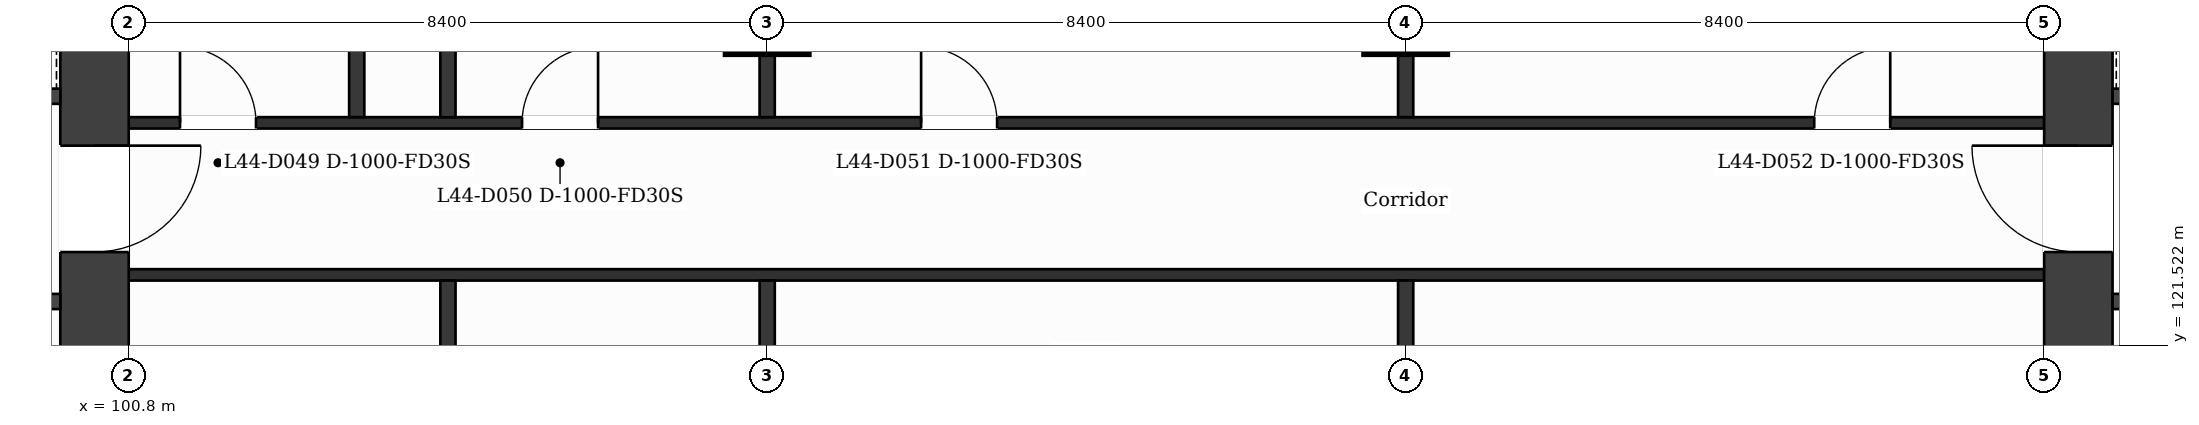
"""IFC4 building model, lengths in metres.
Left out: names, types, materials, properties, quantities, classifications, styles, units other than length and angle.
Written with IfcOpenShell. Run it as: python <this file> out.ifc"""

import sys

from ifc_helpers import new_model, si_unit, direction, frame, frame_2d, origin, origin_2d, place, context, subcontext, project, spatial, rectangle, extrude, element, fill, save


model = new_model("IFC4")
c1 = context("Model", 3, precision=1e-05, world=origin(), true_north=direction((0.0, 1.0)))
c2 = subcontext(c1, "Body", "Model", "MODEL_VIEW")
j1 = project(units=[si_unit("LENGTHUNIT", "METRE"), si_unit("PLANEANGLEUNIT", "RADIAN")], contexts=[c1])
p1 = place(None, origin())
s1 = spatial("IfcSite", under=j1, at=p1, CompositionType="ELEMENT")
p2 = place(p1, origin())
s2 = spatial("IfcBuilding", under=s1, at=p2, CompositionType="ELEMENT")
p3 = place(p2, frame((0.0, 0.0, 184.8)))
s3 = spatial("IfcBuildingStorey", under=s2, at=p3, CompositionType="ELEMENT", Elevation=184.8)
p4 = place(p3, frame((100.35, 131.95, 0.0), z_axis=(0.0, 0.0, 1.0), x_axis=(0.0, -1.0, 0.0)))
e1 = element("IfcWall", 1, at=p4, inside=s3, PredefinedType="SHEAR", context=c2, shape_type="SweptSolid", body=[
    extrude(rectangle(XDim=21.1, YDim=0.9, at=frame_2d((10.55, 0.0))), origin(), (0.0, 0.0, 1.0), 3.7),
])
p5 = place(p4, frame((7.8, 0.0, 0.0)))
e2 = element("IfcOpeningElement", 2, at=p5, cuts=e1, PredefinedType="OPENING", context=c2, shape_type="SweptSolid", body=[
    extrude(rectangle(XDim=1.4, YDim=2.1, at=frame_2d((0.7, 1.05))), frame((0.0, 0.46, 0.0), z_axis=(0.0, -1.0, 0.0), x_axis=(1.0, 0.0, 0.0)), (0.0, 0.0, 1.0), 0.92),
])
p6 = place(p3, frame((126.45, 110.85, 0.0), z_axis=(0.0, 0.0, 1.0), x_axis=(0.0, 1.0, 0.0)))
e3 = element("IfcWall", 3, at=p6, inside=s3, PredefinedType="SHEAR", context=c2, shape_type="SweptSolid", body=[
    extrude(rectangle(XDim=21.1, YDim=0.9, at=frame_2d((10.55, 0.0))), origin(), (0.0, 0.0, 1.0), 3.7),
])
p7 = place(p6, frame((11.9, 0.0, 0.0)))
e4 = element("IfcOpeningElement", 4, at=p7, cuts=e3, PredefinedType="OPENING", context=c2, shape_type="SweptSolid", body=[
    extrude(rectangle(XDim=1.4, YDim=2.1, at=frame_2d((0.7, 1.05))), frame((0.0, 0.46, 0.0), z_axis=(0.0, -1.0, 0.0), x_axis=(1.0, 0.0, 0.0)), (0.0, 0.0, 1.0), 0.92),
])
for number, where, z_axis, x_axis in (
    (5, (109.2, 125.9, 0.0), (0.0, 0.0, 1.0), (1.0, 0.0, 0.0)),
    (6, (117.6, 125.9, 0.0), (0.0, 0.0, 1.0), (1.0, 0.0, 0.0)),
):
    element("IfcColumn", number, at=place(p3, frame(where, z_axis=z_axis, x_axis=x_axis)), inside=s3, PredefinedType="COLUMN", context=c2, shape_type="SweptSolid", body=[
        extrude(rectangle(XDim=1.1, YDim=1.1, at=origin_2d()), origin(), (0.0, 0.0, 1.0), 3.7),
    ])
p8 = place(p3, frame((95.227, 122.1, 0.0), z_axis=(0.0, 0.0, 1.0), x_axis=(1.0, 0.0, 0.0)))
e7 = element("IfcWall", 7, at=p8, inside=s3, PredefinedType="PARTITIONING", context=c2, shape_type="SweptSolid", body=[
    extrude(rectangle(XDim=4.673, YDim=0.2, at=frame_2d((2.336, 0.0))), origin(), (0.0, 0.0, 1.0), 3.38),
])
p9 = place(p8, frame((1.579, 0.0, 0.0)))
e8 = element("IfcOpeningElement", 8, at=p9, cuts=e7, PredefinedType="OPENING", context=c2, shape_type="SweptSolid", body=[
    extrude(rectangle(XDim=0.9, YDim=2.1, at=frame_2d((0.45, 1.05))), frame((0.0, 0.11, 0.0), z_axis=(0.0, -1.0, 0.0), x_axis=(1.0, 0.0, 0.0)), (0.0, 0.0, 1.0), 0.22),
])
p10 = place(p3, frame((126.9, 122.1, 0.0), z_axis=(0.0, 0.0, 1.0), x_axis=(1.0, 0.0, 0.0)))
e9 = element("IfcWall", 9, at=p10, inside=s3, PredefinedType="PARTITIONING", context=c2, shape_type="SweptSolid", body=[
    extrude(rectangle(XDim=4.673, YDim=0.2, at=frame_2d((2.336, 0.0))), origin(), (0.0, 0.0, 1.0), 3.38),
])
p11 = place(p10, frame((1.579, 0.0, 0.0)))
e10 = element("IfcOpeningElement", 10, at=p11, cuts=e9, PredefinedType="OPENING", context=c2, shape_type="SweptSolid", body=[
    extrude(rectangle(XDim=0.9, YDim=2.1, at=frame_2d((0.45, 1.05))), frame((0.0, 0.11, 0.0), z_axis=(0.0, -1.0, 0.0), x_axis=(1.0, 0.0, 0.0)), (0.0, 0.0, 1.0), 0.22),
])
p12 = place(p3, frame((100.8, 122.45, 0.0), z_axis=(0.0, 0.0, 1.0), x_axis=(1.0, 0.0, 0.0)))
e11 = element("IfcWall", 11, at=p12, inside=s3, PredefinedType="PARTITIONING", context=c2, shape_type="SweptSolid", body=[
    extrude(rectangle(XDim=25.2, YDim=0.15, at=frame_2d((12.6, 0.0))), origin(), (0.0, 0.0, 1.0), 3.38),
])
p13 = place(p3, frame((100.8, 124.45, 0.0), z_axis=(0.0, 0.0, 1.0), x_axis=(1.0, 0.0, 0.0)))
e12 = element("IfcWall", 12, at=p13, inside=s3, PredefinedType="PARTITIONING", context=c2, shape_type="SweptSolid", body=[
    extrude(rectangle(XDim=25.2, YDim=0.15, at=frame_2d((12.6, 0.0))), origin(), (0.0, 0.0, 1.0), 3.38),
])
p14 = place(p13, frame((0.675, 0.0, 0.0)))
e13 = element("IfcOpeningElement", 13, at=p14, cuts=e12, PredefinedType="OPENING", context=c2, shape_type="SweptSolid", body=[
    extrude(rectangle(XDim=1.0, YDim=2.1, at=frame_2d((0.5, 1.05))), frame((0.0, 0.085, 0.0), z_axis=(0.0, -1.0, 0.0), x_axis=(1.0, 0.0, 0.0)), (0.0, 0.0, 1.0), 0.17),
])
p15 = place(p13, frame((5.175, 0.0, 0.0)))
e14 = element("IfcOpeningElement", 14, at=p15, cuts=e12, PredefinedType="OPENING", context=c2, shape_type="SweptSolid", body=[
    extrude(rectangle(XDim=1.0, YDim=2.1, at=frame_2d((0.5, 1.05))), frame((0.0, 0.085, 0.0), z_axis=(0.0, -1.0, 0.0), x_axis=(1.0, 0.0, 0.0)), (0.0, 0.0, 1.0), 0.17),
])
p16 = place(p13, frame((10.425, 0.0, 0.0)))
e15 = element("IfcOpeningElement", 15, at=p16, cuts=e12, PredefinedType="OPENING", context=c2, shape_type="SweptSolid", body=[
    extrude(rectangle(XDim=1.0, YDim=2.1, at=frame_2d((0.5, 1.05))), frame((0.0, 0.085, 0.0), z_axis=(0.0, -1.0, 0.0), x_axis=(1.0, 0.0, 0.0)), (0.0, 0.0, 1.0), 0.17),
])
p17 = place(p13, frame((22.175, 0.0, 0.0)))
e16 = element("IfcOpeningElement", 16, at=p17, cuts=e12, PredefinedType="OPENING", context=c2, shape_type="SweptSolid", body=[
    extrude(rectangle(XDim=1.0, YDim=2.1, at=frame_2d((0.5, 1.05))), frame((0.0, 0.085, 0.0), z_axis=(0.0, -1.0, 0.0), x_axis=(1.0, 0.0, 0.0)), (0.0, 0.0, 1.0), 0.17),
])
p18 = place(p3, frame((92.702, 124.8, 0.0), z_axis=(0.0, 0.0, 1.0), x_axis=(1.0, 0.0, 0.0)))
e17 = element("IfcWall", 17, at=p18, inside=s3, PredefinedType="PARTITIONING", context=c2, shape_type="SweptSolid", body=[
    extrude(rectangle(XDim=7.198, YDim=0.2, at=frame_2d((3.599, 0.0))), origin(), (0.0, 0.0, 1.0), 3.38),
])
p19 = place(p18, frame((5.609, 0.0, 0.0)))
e18 = element("IfcOpeningElement", 18, at=p19, cuts=e17, PredefinedType="OPENING", context=c2, shape_type="SweptSolid", body=[
    extrude(rectangle(XDim=1.1, YDim=2.1, at=frame_2d((0.55, 1.05))), frame((0.0, 0.11, 0.0), z_axis=(0.0, -1.0, 0.0), x_axis=(1.0, 0.0, 0.0)), (0.0, 0.0, 1.0), 0.22),
])
p20 = place(p3, frame((126.9, 124.8, 0.0), z_axis=(0.0, 0.0, 1.0), x_axis=(1.0, 0.0, 0.0)))
e19 = element("IfcWall", 19, at=p20, inside=s3, PredefinedType="PARTITIONING", context=c2, shape_type="SweptSolid", body=[
    extrude(rectangle(XDim=4.715, YDim=0.2, at=frame_2d((2.358, 0.0))), origin(), (0.0, 0.0, 1.0), 3.38),
])
p21 = place(p20, frame((0.573, 0.0, 0.0)))
e20 = element("IfcOpeningElement", 20, at=p21, cuts=e19, PredefinedType="OPENING", context=c2, shape_type="SweptSolid", body=[
    extrude(rectangle(XDim=1.1, YDim=2.1, at=frame_2d((0.55, 1.05))), frame((0.0, 0.11, 0.0), z_axis=(0.0, -1.0, 0.0), x_axis=(1.0, 0.0, 0.0)), (0.0, 0.0, 1.0), 0.22),
])
p22 = place(p3, frame((103.8, 124.525, 0.0), z_axis=(0.0, 0.0, 1.0), x_axis=(0.0, 1.0, 0.0)))
e21 = element("IfcWall", 21, at=p22, inside=s3, PredefinedType="PARTITIONING", context=c2, shape_type="SweptSolid", body=[
    extrude(rectangle(XDim=5.825, YDim=0.2, at=frame_2d((2.913, 0.0))), origin(), (0.0, 0.0, 1.0), 3.38),
])
p23 = place(p3, frame((105.0, 109.075, 0.0), z_axis=(0.0, 0.0, 1.0), x_axis=(0.0, 1.0, 0.0)))
e22 = element("IfcWall", 22, at=p23, inside=s3, PredefinedType="PARTITIONING", context=c2, shape_type="SweptSolid", body=[
    extrude(rectangle(XDim=13.3, YDim=0.2, at=frame_2d((6.65, 0.0))), origin(), (0.0, 0.0, 1.0), 3.38),
])
p24 = place(p3, frame((105.0, 124.525, 0.0), z_axis=(0.0, 0.0, 1.0), x_axis=(0.0, 1.0, 0.0)))
e23 = element("IfcWall", 23, at=p24, inside=s3, PredefinedType="PARTITIONING", context=c2, shape_type="SweptSolid", body=[
    extrude(rectangle(XDim=9.2, YDim=0.2, at=frame_2d((4.6, 0.0))), origin(), (0.0, 0.0, 1.0), 3.38),
])
p25 = place(p3, frame((109.2, 109.075, 0.0), z_axis=(0.0, 0.0, 1.0), x_axis=(0.0, 1.0, 0.0)))
e24 = element("IfcWall", 24, at=p25, inside=s3, PredefinedType="PARTITIONING", context=c2, shape_type="SweptSolid", body=[
    extrude(rectangle(XDim=13.3, YDim=0.2, at=frame_2d((6.65, 0.0))), origin(), (0.0, 0.0, 1.0), 3.38),
])
p26 = place(p3, frame((109.2, 124.525, 0.0), z_axis=(0.0, 0.0, 1.0), x_axis=(0.0, 1.0, 0.0)))
e25 = element("IfcWall", 25, at=p26, inside=s3, PredefinedType="PARTITIONING", context=c2, shape_type="SweptSolid", body=[
    extrude(rectangle(XDim=9.2, YDim=0.2, at=frame_2d((4.6, 0.0))), origin(), (0.0, 0.0, 1.0), 3.38),
])
p27 = place(p3, frame((117.6, 109.075, 0.0), z_axis=(0.0, 0.0, 1.0), x_axis=(0.0, 1.0, 0.0)))
e26 = element("IfcWall", 26, at=p27, inside=s3, PredefinedType="PARTITIONING", context=c2, shape_type="SweptSolid", body=[
    extrude(rectangle(XDim=13.3, YDim=0.2, at=frame_2d((6.65, 0.0))), origin(), (0.0, 0.0, 1.0), 3.38),
])
p28 = place(p3, frame((117.6, 124.525, 0.0), z_axis=(0.0, 0.0, 1.0), x_axis=(0.0, 1.0, 0.0)))
e27 = element("IfcWall", 27, at=p28, inside=s3, PredefinedType="PARTITIONING", context=c2, shape_type="SweptSolid", body=[
    extrude(rectangle(XDim=9.2, YDim=0.2, at=frame_2d((4.6, 0.0))), origin(), (0.0, 0.0, 1.0), 3.38),
])
p29 = place(p14, origin())
e28 = element("IfcDoor", 28, at=p29, inside=s3, OperationType="SINGLE_SWING_LEFT", PredefinedType="DOOR", context=c2, shape_type="SweptSolid", body=[
    extrude(rectangle(XDim=1.0, YDim=2.1, at=frame_2d((0.5, 1.05))), frame((0.0, 0.025, 0.0), z_axis=(0.0, -1.0, 0.0), x_axis=(1.0, 0.0, 0.0)), (0.0, 0.0, 1.0), 0.05),
])
fill(e13, e28)
p30 = place(p15, origin())
e29 = element("IfcDoor", 29, at=p30, inside=s3, OperationType="SINGLE_SWING_RIGHT", PredefinedType="DOOR", context=c2, shape_type="SweptSolid", body=[
    extrude(rectangle(XDim=1.0, YDim=2.1, at=frame_2d((0.5, 1.05))), frame((0.0, 0.025, 0.0), z_axis=(0.0, -1.0, 0.0), x_axis=(1.0, 0.0, 0.0)), (0.0, 0.0, 1.0), 0.05),
])
fill(e14, e29)
p31 = place(p16, origin())
e30 = element("IfcDoor", 30, at=p31, inside=s3, OperationType="SINGLE_SWING_LEFT", PredefinedType="DOOR", context=c2, shape_type="SweptSolid", body=[
    extrude(rectangle(XDim=1.0, YDim=2.1, at=frame_2d((0.5, 1.05))), frame((0.0, 0.025, 0.0), z_axis=(0.0, -1.0, 0.0), x_axis=(1.0, 0.0, 0.0)), (0.0, 0.0, 1.0), 0.05),
])
fill(e15, e30)
p32 = place(p17, origin())
e31 = element("IfcDoor", 31, at=p32, inside=s3, OperationType="SINGLE_SWING_RIGHT", PredefinedType="DOOR", context=c2, shape_type="SweptSolid", body=[
    extrude(rectangle(XDim=1.0, YDim=2.1, at=frame_2d((0.5, 1.05))), frame((0.0, 0.025, 0.0), z_axis=(0.0, -1.0, 0.0), x_axis=(1.0, 0.0, 0.0)), (0.0, 0.0, 1.0), 0.05),
])
fill(e16, e31)
p33 = place(p5, origin())
e32 = element("IfcDoor", 32, at=p33, inside=s3, OperationType="SINGLE_SWING_LEFT", PredefinedType="DOOR", context=c2, shape_type="SweptSolid", body=[
    extrude(rectangle(XDim=1.4, YDim=2.1, at=frame_2d((0.7, 1.05))), frame((0.0, 0.025, 0.0), z_axis=(0.0, -1.0, 0.0), x_axis=(1.0, 0.0, 0.0)), (0.0, 0.0, 1.0), 0.05),
])
fill(e2, e32)
p34 = place(p7, origin())
e33 = element("IfcDoor", 33, at=p34, inside=s3, OperationType="SINGLE_SWING_RIGHT", PredefinedType="DOOR", context=c2, shape_type="SweptSolid", body=[
    extrude(rectangle(XDim=1.4, YDim=2.1, at=frame_2d((0.7, 1.05))), frame((0.0, 0.025, 0.0), z_axis=(0.0, -1.0, 0.0), x_axis=(1.0, 0.0, 0.0)), (0.0, 0.0, 1.0), 0.05),
])
fill(e4, e33)
save(model, sys.argv[1])
